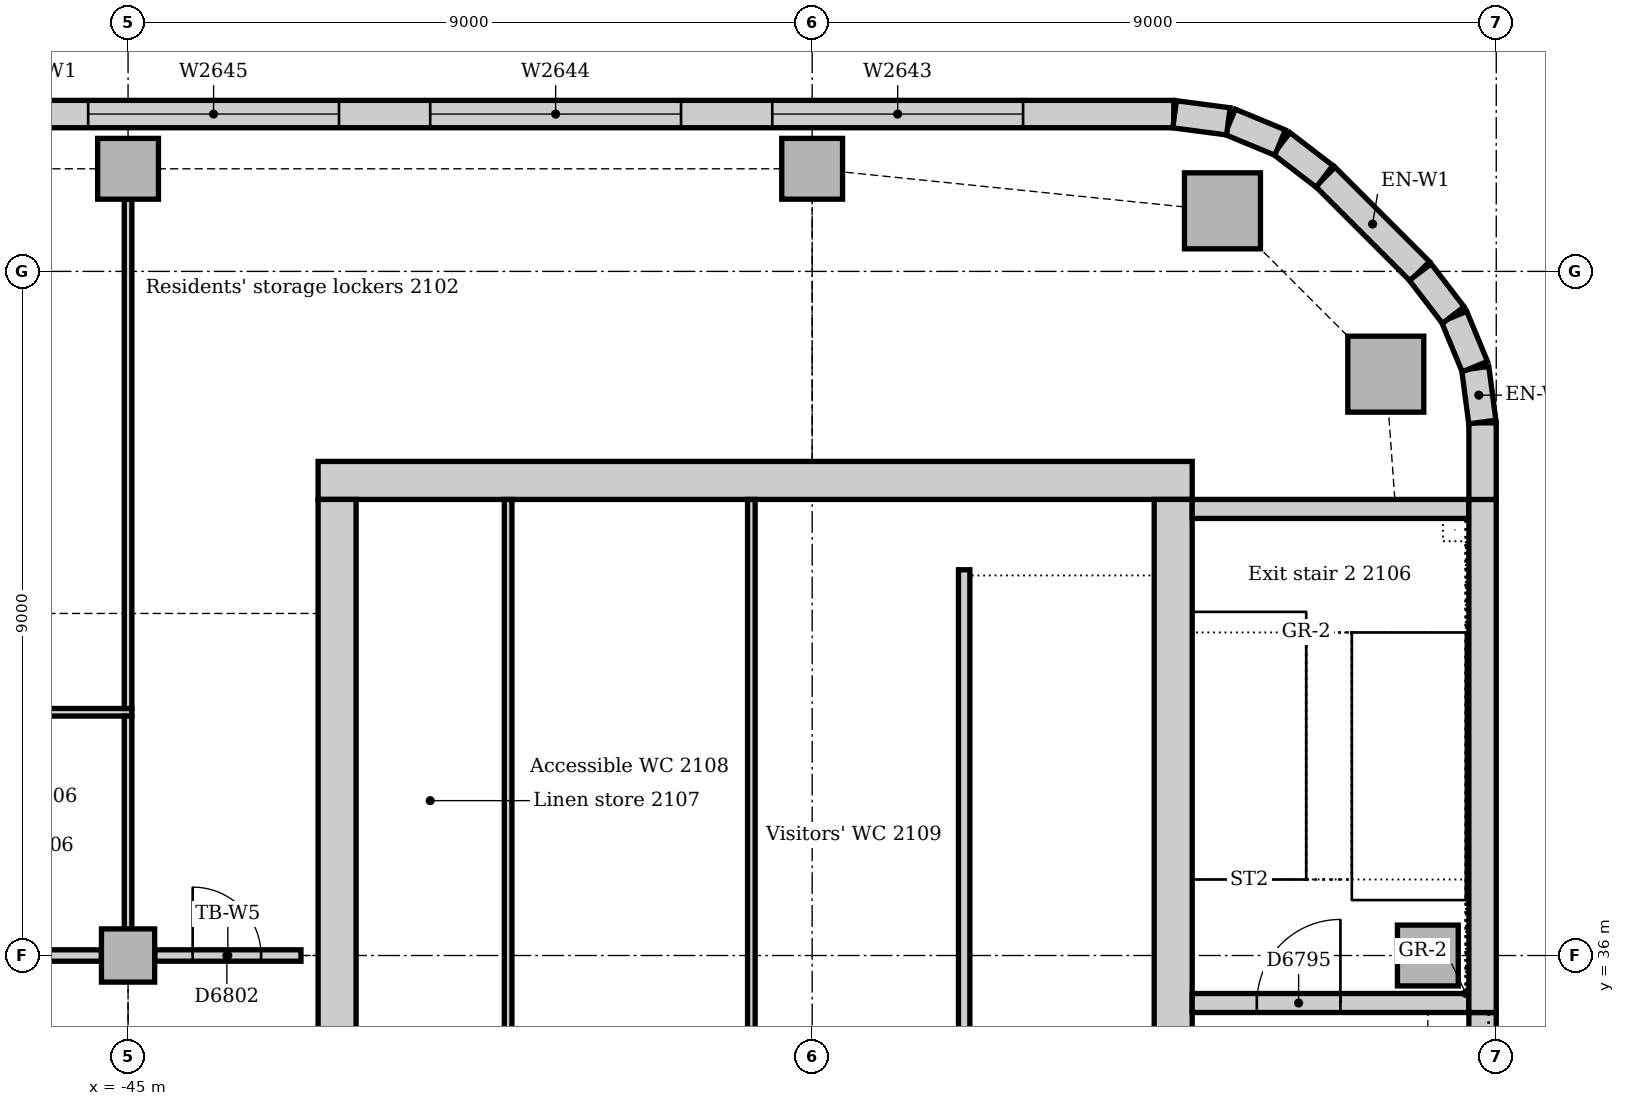
"""IFC4 building model, lengths in metres.
Left out: names, types, materials, properties, quantities, classifications, styles, units other than length and angle.
Written with IfcOpenShell. Run it as: python <this file> out.ifc"""

import sys

from ifc_helpers import new_model, si_unit, direction, frame, frame_2d, origin, origin_2d, place, context, subcontext, project, spatial, rectangle, extrude, element, fill, save


model = new_model("IFC4")
c1 = context("Model", 3, precision=1e-05, world=origin(), true_north=direction((0.0, 1.0)))
c2 = subcontext(c1, "Body", "Model", "MODEL_VIEW")
j1 = project(units=[si_unit("LENGTHUNIT", "METRE"), si_unit("PLANEANGLEUNIT", "RADIAN")], contexts=[c1])
p1 = place(None, origin())
s1 = spatial("IfcSite", under=j1, at=p1, CompositionType="ELEMENT")
p2 = place(p1, origin())
s2 = spatial("IfcBuilding", under=s1, at=p2, CompositionType="ELEMENT")
p3 = place(p2, frame((0.0, 0.0, 91.0)))
s3 = spatial("IfcBuildingStorey", under=s2, at=p3, CompositionType="ELEMENT", Elevation=91.0)
p4 = place(p3, frame((-31.0, 42.25, 0.0), z_axis=(0.0, 0.0, 1.0), x_axis=(-1.0, 0.0, 0.0)))
e1 = element("IfcWall", 1, at=p4, inside=s3, PredefinedType="SOLIDWALL", context=c2, shape_type="SweptSolid", body=[
    extrude(rectangle(XDim=11.5, YDim=0.5, at=frame_2d((5.75, 0.0))), origin(), (0.0, 0.0, 1.0), 4.0),
])
p5 = place(p3, frame((-31.25, 30.5, 0.0), z_axis=(0.0, 0.0, 1.0), x_axis=(0.0, 1.0, 0.0)))
e2 = element("IfcWall", 2, at=p5, inside=s3, PredefinedType="SOLIDWALL", context=c2, shape_type="SweptSolid", body=[
    extrude(rectangle(XDim=11.5, YDim=0.5, at=frame_2d((5.75, 0.0))), origin(), (0.0, 0.0, 1.0), 4.0),
])
p6 = place(p5, frame((0.85, 0.0, 0.0)))
e3 = element("IfcOpeningElement", 3, at=p6, cuts=e2, PredefinedType="OPENING", context=c2, shape_type="SweptSolid", body=[
    extrude(rectangle(XDim=1.8, YDim=2.1, at=frame_2d((0.9, 1.05))), frame((0.0, 0.26, 0.0), z_axis=(0.0, -1.0, 0.0), x_axis=(1.0, 0.0, 0.0)), (0.0, 0.0, 1.0), 0.52),
])
p7 = place(p3, frame((-42.25, 42.0, 0.0), z_axis=(0.0, 0.0, 1.0), x_axis=(0.0, -1.0, 0.0)))
e4 = element("IfcWall", 4, at=p7, inside=s3, PredefinedType="SOLIDWALL", context=c2, shape_type="SweptSolid", body=[
    extrude(rectangle(XDim=11.5, YDim=0.5, at=frame_2d((5.75, 0.0))), origin(), (0.0, 0.0, 1.0), 4.0),
])
p8 = place(p7, frame((8.85, 0.0, 0.0)))
e5 = element("IfcOpeningElement", 5, at=p8, cuts=e4, PredefinedType="OPENING", context=c2, shape_type="SweptSolid", body=[
    extrude(rectangle(XDim=1.8, YDim=2.1, at=frame_2d((0.9, 1.05))), frame((0.0, 0.26, 0.0), z_axis=(0.0, -1.0, 0.0), x_axis=(1.0, 0.0, 0.0)), (0.0, 0.0, 1.0), 0.52),
])
p9 = place(p3, frame((-31.0, 35.375, 0.0), z_axis=(0.0, 0.0, 1.0), x_axis=(1.0, 0.0, 0.0)))
e6 = element("IfcWall", 6, at=p9, inside=s3, PredefinedType="SOLIDWALL", context=c2, shape_type="SweptSolid", body=[
    extrude(rectangle(XDim=3.64, YDim=0.25, at=frame_2d((1.82, 0.0))), origin(), (0.0, 0.0, 1.0), 4.0),
])
p10 = place(p9, frame((0.85, 0.0, 0.0)))
e7 = element("IfcOpeningElement", 7, at=p10, cuts=e6, PredefinedType="OPENING", context=c2, shape_type="SweptSolid", body=[
    extrude(rectangle(XDim=1.1, YDim=2.1, at=frame_2d((0.55, 1.05))), frame((0.0, 0.135, 0.0), z_axis=(0.0, -1.0, 0.0), x_axis=(1.0, 0.0, 0.0)), (0.0, 0.0, 1.0), 0.27),
])
p11 = place(p3, frame((-27.36, 41.875, 0.0), z_axis=(0.0, 0.0, 1.0), x_axis=(-1.0, 0.0, 0.0)))
e8 = element("IfcWall", 8, at=p11, inside=s3, PredefinedType="SOLIDWALL", context=c2, shape_type="SweptSolid", body=[
    extrude(rectangle(XDim=3.64, YDim=0.25, at=frame_2d((1.82, 0.0))), origin(), (0.0, 0.0, 1.0), 4.0),
])
for number, where, z_axis, x_axis in (
    (9, (-28.453, 43.648, 0.0), (0.0, 0.0, 1.0), (1.0, 0.0, 0.0)),
    (10, (-30.602, 45.797, 0.0), (0.0, 0.0, 1.0), (1.0, 0.0, 0.0)),
):
    element("IfcColumn", number, at=place(p3, frame(where, z_axis=z_axis, x_axis=x_axis)), inside=s3, PredefinedType="COLUMN", context=c2, shape_type="SweptSolid", body=[
        extrude(rectangle(XDim=1.0, YDim=1.0, at=origin_2d()), origin(), (0.0, 0.0, 1.0), 3.7),
    ])
p12 = place(p3, frame((-27.9, 36.0, 0.0), z_axis=(0.0, 0.0, 1.0), x_axis=(1.0, 0.0, 0.0)))
e11 = element("IfcColumn", 11, at=p12, inside=s3, PredefinedType="COLUMN", context=c2, shape_type="SweptSolid", body=[
    extrude(rectangle(XDim=0.8, YDim=0.8, at=origin_2d()), origin(), (0.0, 0.0, 1.0), 4.0),
])
for number, where, z_axis, x_axis in (
    (12, (-45.0, 46.35, 0.0), (0.0, 0.0, 1.0), (1.0, 0.0, 0.0)),
    (13, (-36.0, 46.35, 0.0), (0.0, 0.0, 1.0), (1.0, 0.0, 0.0)),
):
    element("IfcColumn", number, at=place(p3, frame(where, z_axis=z_axis, x_axis=x_axis)), inside=s3, PredefinedType="COLUMN", context=c2, shape_type="SweptSolid", body=[
        extrude(rectangle(XDim=0.8, YDim=0.8, at=origin_2d()), origin(), (0.0, 0.0, 1.0), 3.7),
    ])
p13 = place(p3, frame((-45.0, 36.0, 0.0), z_axis=(0.0, 0.0, 1.0), x_axis=(1.0, 0.0, 0.0)))
e14 = element("IfcColumn", 14, at=p13, inside=s3, PredefinedType="COLUMN", context=c2, shape_type="SweptSolid", body=[
    extrude(rectangle(XDim=0.7, YDim=0.7, at=origin_2d()), origin(), (0.0, 0.0, 1.0), 3.7),
])
p14 = place(p3, frame((-27.18, 27.75, 0.0), z_axis=(0.0, 0.0, 1.0), x_axis=(0.0, 1.0, 0.0)))
e15 = element("IfcWall", 15, at=p14, inside=s3, PredefinedType="STANDARD", context=c2, shape_type="SweptSolid", body=[
    extrude(rectangle(XDim=7.5, YDim=0.36, at=frame_2d((3.75, 0.0))), origin(), (0.0, 0.0, 1.0), 3.7),
])
p15 = place(p14, frame((2.85, 0.0, 1.2)))
e16 = element("IfcOpeningElement", 16, at=p15, cuts=e15, PredefinedType="OPENING", context=c2, shape_type="SweptSolid", body=[
    extrude(rectangle(XDim=1.8, YDim=1.2, at=frame_2d((0.9, 0.6))), frame((0.0, 0.19, 0.0), z_axis=(0.0, -1.0, 0.0), x_axis=(1.0, 0.0, 0.0)), (0.0, 0.0, 1.0), 0.38),
])
p16 = place(p3, frame((-27.18, 35.25, 0.0), z_axis=(0.0, 0.0, 1.0), x_axis=(0.0, 1.0, 0.0)))
e17 = element("IfcWall", 17, at=p16, inside=s3, PredefinedType="STANDARD", context=c2, shape_type="SweptSolid", body=[
    extrude(rectangle(XDim=6.75, YDim=0.36, at=frame_2d((3.375, 0.0))), origin(), (0.0, 0.0, 1.0), 3.7),
])
p17 = place(p3, frame((-27.18, 42.0, 0.0), z_axis=(0.0, 0.0, 1.0), x_axis=(0.0, 1.0, 0.0)))
e18 = element("IfcWall", 18, at=p17, inside=s3, PredefinedType="STANDARD", context=c2, shape_type="SweptSolid", body=[
    extrude(rectangle(XDim=1.007, YDim=0.36, at=frame_2d((0.504, 0.0))), origin(), (0.0, 0.0, 1.0), 3.7),
])
p18 = place(p3, frame((-28.006, 45.001, 0.0), z_axis=(0.0, 0.0, 1.0), x_axis=(-0.707106781187, 0.707106781187, 0.0)))
e19 = element("IfcWall", 19, at=p18, inside=s3, PredefinedType="STANDARD", context=c2, shape_type="SweptSolid", body=[
    extrude(rectangle(XDim=1.757, YDim=0.36, at=frame_2d((0.879, 0.0))), origin(), (0.0, 0.0, 1.0), 3.7),
])
p19 = place(p3, frame((-31.243, 47.07, 0.0), z_axis=(0.0, 0.0, 1.0), x_axis=(-1.0, 0.0, 0.0)))
e20 = element("IfcWall", 20, at=p19, inside=s3, PredefinedType="STANDARD", context=c2, shape_type="SweptSolid", body=[
    extrude(rectangle(XDim=29.765, YDim=0.36, at=frame_2d((14.882, 0.0))), origin(), (0.0, 0.0, 1.0), 3.7),
])
p20 = place(p19, frame((1.982, 0.0, 0.9)))
e21 = element("IfcOpeningElement", 21, at=p20, cuts=e20, PredefinedType="OPENING", context=c2, shape_type="SweptSolid", body=[
    extrude(rectangle(XDim=3.3, YDim=1.6, at=frame_2d((1.65, 0.8))), frame((0.0, 0.19, 0.0), z_axis=(0.0, -1.0, 0.0), x_axis=(1.0, 0.0, 0.0)), (0.0, 0.0, 1.0), 0.38),
])
p21 = place(p19, frame((6.482, 0.0, 0.9)))
e22 = element("IfcOpeningElement", 22, at=p21, cuts=e20, PredefinedType="OPENING", context=c2, shape_type="SweptSolid", body=[
    extrude(rectangle(XDim=3.3, YDim=1.6, at=frame_2d((1.65, 0.8))), frame((0.0, 0.19, 0.0), z_axis=(0.0, -1.0, 0.0), x_axis=(1.0, 0.0, 0.0)), (0.0, 0.0, 1.0), 0.38),
])
p22 = place(p19, frame((10.982, 0.0, 0.9)))
e23 = element("IfcOpeningElement", 23, at=p22, cuts=e20, PredefinedType="OPENING", context=c2, shape_type="SweptSolid", body=[
    extrude(rectangle(XDim=3.3, YDim=1.6, at=frame_2d((1.65, 0.8))), frame((0.0, 0.19, 0.0), z_axis=(0.0, -1.0, 0.0), x_axis=(1.0, 0.0, 0.0)), (0.0, 0.0, 1.0), 0.38),
])
p23 = place(p19, frame((15.482, 0.0, 0.9)))
e24 = element("IfcOpeningElement", 24, at=p23, cuts=e20, PredefinedType="OPENING", context=c2, shape_type="SweptSolid", body=[
    extrude(rectangle(XDim=3.3, YDim=1.6, at=frame_2d((1.65, 0.8))), frame((0.0, 0.19, 0.0), z_axis=(0.0, -1.0, 0.0), x_axis=(1.0, 0.0, 0.0)), (0.0, 0.0, 1.0), 0.38),
])
p24 = place(p19, frame((19.982, 0.0, 0.9)))
e25 = element("IfcOpeningElement", 25, at=p24, cuts=e20, PredefinedType="OPENING", context=c2, shape_type="SweptSolid", body=[
    extrude(rectangle(XDim=3.3, YDim=1.6, at=frame_2d((1.65, 0.8))), frame((0.0, 0.19, 0.0), z_axis=(0.0, -1.0, 0.0), x_axis=(1.0, 0.0, 0.0)), (0.0, 0.0, 1.0), 0.38),
])
p25 = place(p19, frame((24.482, 0.0, 0.9)))
e26 = element("IfcOpeningElement", 26, at=p25, cuts=e20, PredefinedType="OPENING", context=c2, shape_type="SweptSolid", body=[
    extrude(rectangle(XDim=3.3, YDim=1.6, at=frame_2d((1.65, 0.8))), frame((0.0, 0.19, 0.0), z_axis=(0.0, -1.0, 0.0), x_axis=(1.0, 0.0, 0.0)), (0.0, 0.0, 1.0), 0.38),
])
for number, where, z_axis, x_axis in (
    (27, (-27.183, 43.019, 0.0), (0.0, 0.0, 1.0), (-0.131, 0.991, 0.0)),
    (28, (-27.282, 43.747, 0.0), (0.0, 0.0, 1.0), (-0.383, 0.924, 0.0)),
):
    element("IfcWall", number, at=place(p3, frame(where, z_axis=z_axis, x_axis=x_axis)), inside=s3, PredefinedType="STANDARD", context=c2, shape_type="SweptSolid", body=[
        extrude(rectangle(XDim=0.713, YDim=0.36, at=frame_2d((0.356, 0.0))), origin(), (0.0, 0.0, 1.0), 3.7),
    ])
for number, where, z_axis, x_axis in (
    (29, (-27.566, 44.425, 0.0), (0.0, 0.0, 1.0), (-0.609, 0.793, 0.0)),
    (30, (-29.259, 46.25, 0.0), (0.0, 0.0, 1.0), (-0.793, 0.609, 0.0)),
):
    element("IfcWall", number, at=place(p3, frame(where, z_axis=z_axis, x_axis=x_axis)), inside=s3, PredefinedType="STANDARD", context=c2, shape_type="SweptSolid", body=[
        extrude(rectangle(XDim=0.713, YDim=0.36, at=frame_2d((0.357, 0.0))), origin(), (0.0, 0.0, 1.0), 3.7),
    ])
for number, where, z_axis, x_axis in (
    (31, (-29.844, 46.695, 0.0), (0.0, 0.0, 1.0), (-0.924, 0.383, 0.0)),
    (32, (-30.524, 46.974, 0.0), (0.0, 0.0, 1.0), (-0.991, 0.131, 0.0)),
):
    element("IfcWall", number, at=place(p3, frame(where, z_axis=z_axis, x_axis=x_axis)), inside=s3, PredefinedType="STANDARD", context=c2, shape_type="SweptSolid", body=[
        extrude(rectangle(XDim=0.713, YDim=0.36, at=frame_2d((0.356, 0.0))), origin(), (0.0, 0.0, 1.0), 3.7),
    ])
p26 = place(p3, frame((-34.0, 41.075, 0.0), z_axis=(0.0, 0.0, 1.0), x_axis=(0.0, -1.0, 0.0)))
e33 = element("IfcWall", 33, at=p26, inside=s3, PredefinedType="SOLIDWALL", context=c2, shape_type="SweptSolid", body=[
    extrude(rectangle(XDim=7.0, YDim=0.15, at=frame_2d((3.5, 0.0))), origin(), (0.0, 0.0, 1.0), 4.0),
])
for number, where, z_axis, x_axis in (
    (34, (-40.0, 34.075, 0.0), (0.0, 0.0, 1.0), (0.0, 1.0, 0.0)),
    (35, (-36.8, 34.075, 0.0), (0.0, 0.0, 1.0), (0.0, 1.0, 0.0)),
):
    element("IfcWall", number, at=place(p3, frame(where, z_axis=z_axis, x_axis=x_axis)), inside=s3, PredefinedType="PARTITIONING", context=c2, shape_type="SweptSolid", body=[
        extrude(rectangle(XDim=7.925, YDim=0.1, at=frame_2d((3.962, 0.0))), origin(), (0.0, 0.0, 1.0), 3.7),
    ])
p27 = place(p3, frame((-44.65, 36.0, 0.0), z_axis=(0.0, 0.0, 1.0), x_axis=(1.0, 0.0, 0.0)))
e36 = element("IfcWall", 36, at=p27, inside=s3, PredefinedType="PARTITIONING", context=c2, shape_type="SweptSolid", body=[
    extrude(rectangle(XDim=1.925, YDim=0.15, at=frame_2d((0.963, 0.0))), origin(), (0.0, 0.0, 1.0), 3.452),
])
p28 = place(p27, frame((0.5, 0.0, 0.0)))
e37 = element("IfcOpeningElement", 37, at=p28, cuts=e36, PredefinedType="OPENING", context=c2, shape_type="SweptSolid", body=[
    extrude(rectangle(XDim=0.9, YDim=2.1, at=frame_2d((0.45, 1.05))), frame((0.0, 0.085, 0.0), z_axis=(0.0, -1.0, 0.0), x_axis=(1.0, 0.0, 0.0)), (0.0, 0.0, 1.0), 0.17),
])
p29 = place(p3, frame((-53.65, 36.0, 0.0), z_axis=(0.0, 0.0, 1.0), x_axis=(1.0, 0.0, 0.0)))
e38 = element("IfcWall", 38, at=p29, inside=s3, PredefinedType="PARTITIONING", context=c2, shape_type="SweptSolid", body=[
    extrude(rectangle(XDim=8.3, YDim=0.15, at=frame_2d((4.15, 0.0))), origin(), (0.0, 0.0, 1.0), 3.008),
])
p30 = place(p29, frame((2.94, 0.0, 0.0)))
e39 = element("IfcOpeningElement", 39, at=p30, cuts=e38, PredefinedType="OPENING", context=c2, shape_type="SweptSolid", body=[
    extrude(rectangle(XDim=1.0, YDim=2.1, at=frame_2d((0.5, 1.05))), frame((0.0, 0.085, 0.0), z_axis=(0.0, -1.0, 0.0), x_axis=(1.0, 0.0, 0.0)), (0.0, 0.0, 1.0), 0.17),
])
p31 = place(p3, frame((-53.925, 39.2, 0.0), z_axis=(0.0, 0.0, 1.0), x_axis=(1.0, 0.0, 0.0)))
e40 = element("IfcWall", 40, at=p31, inside=s3, PredefinedType="PARTITIONING", context=c2, shape_type="SweptSolid", body=[
    extrude(rectangle(XDim=8.975, YDim=0.1, at=frame_2d((4.487, 0.0))), origin(), (0.0, 0.0, 1.0), 3.7),
])
p32 = place(p31, frame((3.265, 0.0, 0.0)))
e41 = element("IfcOpeningElement", 41, at=p32, cuts=e40, PredefinedType="OPENING", context=c2, shape_type="SweptSolid", body=[
    extrude(rectangle(XDim=0.9, YDim=2.1, at=frame_2d((0.45, 1.05))), frame((0.0, 0.06, 0.0), z_axis=(0.0, -1.0, 0.0), x_axis=(1.0, 0.0, 0.0)), (0.0, 0.0, 1.0), 0.12),
])
p33 = place(p3, frame((-45.0, 39.25, 0.0), z_axis=(0.0, 0.0, 1.0), x_axis=(0.0, 1.0, 0.0)))
e42 = element("IfcWall", 42, at=p33, inside=s3, PredefinedType="PARTITIONING", context=c2, shape_type="SweptSolid", body=[
    extrude(rectangle(XDim=6.7, YDim=0.1, at=frame_2d((3.35, 0.0))), origin(), (0.0, 0.0, 1.0), 3.106),
])
p34 = place(p3, frame((-45.0, 36.35, 0.0), z_axis=(0.0, 0.0, 1.0), x_axis=(0.0, 1.0, 0.0)))
e43 = element("IfcWall", 43, at=p34, inside=s3, PredefinedType="PARTITIONING", context=c2, shape_type="SweptSolid", body=[
    extrude(rectangle(XDim=2.8, YDim=0.1, at=frame_2d((1.4, 0.0))), origin(), (0.0, 0.0, 1.0), 3.106),
])
p35 = place(p20, origin())
e44 = element("IfcWindow", 44, at=p35, inside=s3, PartitioningType="SINGLE_PANEL", PredefinedType="WINDOW", context=c2, shape_type="SweptSolid", body=[
    extrude(rectangle(XDim=3.3, YDim=1.6, at=frame_2d((1.65, 0.8))), frame((0.0, 0.13, 0.0), z_axis=(0.0, -1.0, 0.0), x_axis=(1.0, 0.0, 0.0)), (0.0, 0.0, 1.0), 0.06),
])
fill(e21, e44)
p36 = place(p21, origin())
e45 = element("IfcWindow", 45, at=p36, inside=s3, PartitioningType="SINGLE_PANEL", PredefinedType="WINDOW", context=c2, shape_type="SweptSolid", body=[
    extrude(rectangle(XDim=3.3, YDim=1.6, at=frame_2d((1.65, 0.8))), frame((0.0, 0.13, 0.0), z_axis=(0.0, -1.0, 0.0), x_axis=(1.0, 0.0, 0.0)), (0.0, 0.0, 1.0), 0.06),
])
fill(e22, e45)
p37 = place(p22, origin())
e46 = element("IfcWindow", 46, at=p37, inside=s3, PartitioningType="SINGLE_PANEL", PredefinedType="WINDOW", context=c2, shape_type="SweptSolid", body=[
    extrude(rectangle(XDim=3.3, YDim=1.6, at=frame_2d((1.65, 0.8))), frame((0.0, 0.13, 0.0), z_axis=(0.0, -1.0, 0.0), x_axis=(1.0, 0.0, 0.0)), (0.0, 0.0, 1.0), 0.06),
])
fill(e23, e46)
p38 = place(p10, origin())
e47 = element("IfcDoor", 47, at=p38, inside=s3, OperationType="SINGLE_SWING_RIGHT", PredefinedType="DOOR", context=c2, shape_type="SweptSolid", body=[
    extrude(rectangle(XDim=1.1, YDim=2.1, at=frame_2d((0.55, 1.05))), frame((0.0, 0.025, 0.0), z_axis=(0.0, -1.0, 0.0), x_axis=(1.0, 0.0, 0.0)), (0.0, 0.0, 1.0), 0.05),
])
fill(e7, e47)
p39 = place(p28, origin())
e48 = element("IfcDoor", 48, at=p39, inside=s3, OperationType="SINGLE_SWING_LEFT", PredefinedType="DOOR", context=c2, shape_type="SweptSolid", body=[
    extrude(rectangle(XDim=0.9, YDim=2.1, at=frame_2d((0.45, 1.05))), frame((0.0, 0.025, 0.0), z_axis=(0.0, -1.0, 0.0), x_axis=(1.0, 0.0, 0.0)), (0.0, 0.0, 1.0), 0.05),
])
fill(e37, e48)
save(model, sys.argv[1])
